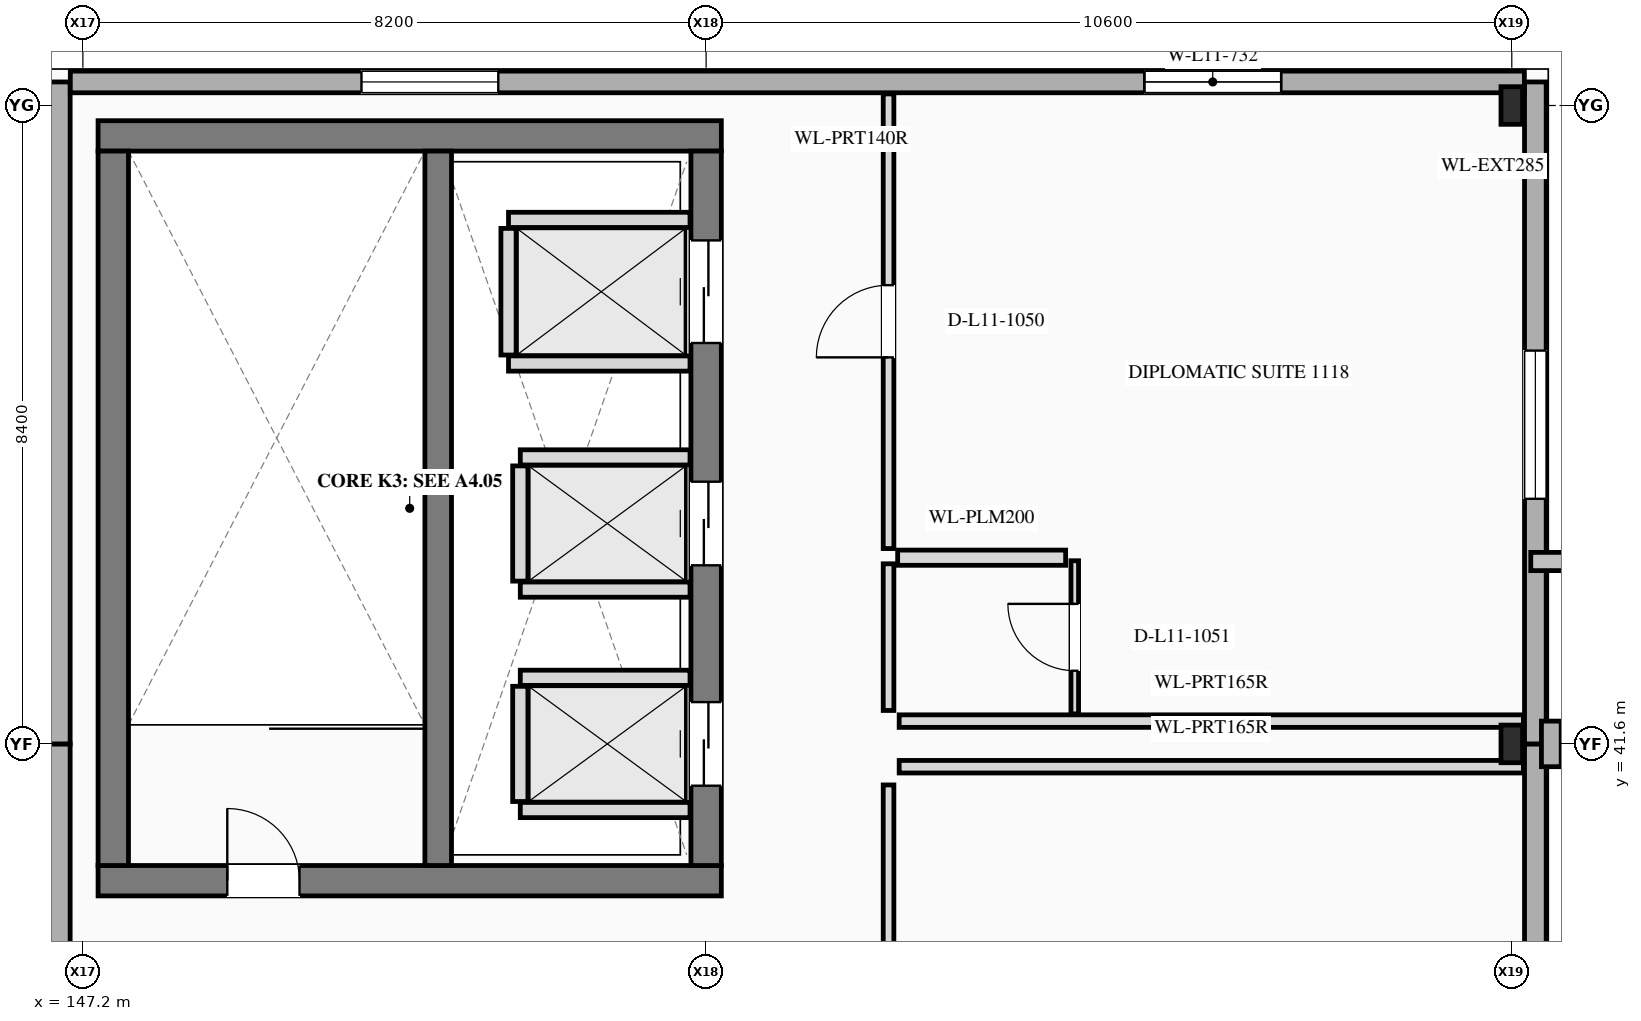
"""IFC4 building model, lengths in metres.
Left out: names, types, materials, properties, quantities, classifications, styles, units other than length and angle.
Written with IfcOpenShell. Run it as: python <this file> out.ifc"""

import sys

from ifc_helpers import new_model, si_unit, direction, frame, frame_2d, origin, origin_2d, place, context, subcontext, project, spatial, rectangle, i_section, extrude, element, fill, save


model = new_model("IFC4")
c1 = context("Model", 3, precision=1e-05, world=origin(), true_north=direction((0.0, 1.0)))
c2 = subcontext(c1, "Body", "Model", "MODEL_VIEW")
j1 = project(units=[si_unit("LENGTHUNIT", "METRE"), si_unit("PLANEANGLEUNIT", "RADIAN")], contexts=[c1])
p1 = place(None, origin())
s1 = spatial("IfcSite", under=j1, at=p1, CompositionType="ELEMENT")
p2 = place(p1, origin())
s2 = spatial("IfcBuilding", under=s1, at=p2, CompositionType="ELEMENT")
p3 = place(p2, frame((0.0, 0.0, 44.6)))
s3 = spatial("IfcBuildingStorey", under=s2, at=p3, CompositionType="ELEMENT", Elevation=44.6)
for number, where, z_axis, x_axis in (
    (1, (166.0, 41.6, 0.0), (0.0, 0.0, 1.0), (1.0, 0.0, 0.0)),
    (2, (166.0, 50.0, 0.0), (0.0, 0.0, 1.0), (1.0, 0.0, 0.0)),
):
    element("IfcColumn", number, at=place(p3, frame(where, z_axis=z_axis, x_axis=x_axis)), inside=s3, PredefinedType="COLUMN", context=c2, shape_type="SweptSolid", body=[
        extrude(i_section(OverallWidth=0.284, OverallDepth=0.495, WebThickness=0.019, FlangeThickness=0.033, at=origin_2d()), origin(), (0.0, 0.0, 1.0), 3.6),
    ])
p4 = place(p3, frame((166.31, 33.2, 0.0), z_axis=(0.0, 0.0, 1.0), x_axis=(0.0, 1.0, 0.0)))
e3 = element("IfcWall", 3, at=p4, inside=s3, PredefinedType="STANDARD", context=c2, shape_type="SweptSolid", body=[
    extrude(rectangle(XDim=8.4, YDim=0.285, at=frame_2d((4.2, 0.0))), origin(), (0.0, 0.0, 1.0), 3.6),
])
p5 = place(p4, frame((3.3, 0.0, 0.85)))
e4 = element("IfcOpeningElement", 4, at=p5, cuts=e3, PredefinedType="OPENING", context=c2, shape_type="SweptSolid", body=[
    extrude(rectangle(XDim=1.8, YDim=1.8, at=frame_2d((0.9, 0.9))), frame((0.0, 0.152, 0.0), z_axis=(0.0, -1.0, 0.0), x_axis=(1.0, 0.0, 0.0)), (0.0, 0.0, 1.0), 0.305),
])
p6 = place(p3, frame((166.31, 41.6, 0.0), z_axis=(0.0, 0.0, 1.0), x_axis=(0.0, 1.0, 0.0)))
e5 = element("IfcWall", 5, at=p6, inside=s3, PredefinedType="STANDARD", context=c2, shape_type="SweptSolid", body=[
    extrude(rectangle(XDim=8.71, YDim=0.285, at=frame_2d((4.355, 0.0))), origin(), (0.0, 0.0, 1.0), 3.6),
])
p7 = place(p6, frame((3.225, 0.0, 0.85)))
e6 = element("IfcOpeningElement", 6, at=p7, cuts=e5, PredefinedType="OPENING", context=c2, shape_type="SweptSolid", body=[
    extrude(rectangle(XDim=1.95, YDim=1.85, at=frame_2d((0.975, 0.925))), frame((0.0, 0.152, 0.0), z_axis=(0.0, -1.0, 0.0), x_axis=(1.0, 0.0, 0.0)), (0.0, 0.0, 1.0), 0.305),
])
p8 = place(p3, frame((166.52, 41.3, 0.0), z_axis=(0.0, 0.0, 1.0), x_axis=(0.0, 1.0, 0.0)))
e7 = element("IfcWall", 7, at=p8, inside=s3, PredefinedType="ELEMENTEDWALL", context=c2, shape_type="SweptSolid", body=[
    extrude(rectangle(XDim=0.6, YDim=0.26, at=frame_2d((0.3, 0.0))), origin(), (0.0, 0.0, 1.0), 3.6),
])
p9 = place(p3, frame((146.89, 33.2, 0.0), z_axis=(0.0, 0.0, 1.0), x_axis=(0.0, 1.0, 0.0)))
e8 = element("IfcWall", 8, at=p9, inside=s3, PredefinedType="STANDARD", context=c2, shape_type="SweptSolid", body=[
    extrude(rectangle(XDim=8.4, YDim=0.285, at=frame_2d((4.2, 0.0))), origin(), (0.0, 0.0, 1.0), 3.6),
])
p10 = place(p3, frame((146.89, 41.6, 0.0), z_axis=(0.0, 0.0, 1.0), x_axis=(0.0, 1.0, 0.0)))
e9 = element("IfcWall", 9, at=p10, inside=s3, PredefinedType="STANDARD", context=c2, shape_type="SweptSolid", body=[
    extrude(rectangle(XDim=8.71, YDim=0.285, at=frame_2d((4.355, 0.0))), origin(), (0.0, 0.0, 1.0), 3.6),
])
p11 = place(p3, frame((166.166, 50.31, 0.0), z_axis=(0.0, 0.0, 1.0), x_axis=(-1.0, 0.0, 0.0)))
e10 = element("IfcWall", 10, at=p11, inside=s3, PredefinedType="STANDARD", context=c2, shape_type="SweptSolid", body=[
    extrude(rectangle(XDim=19.131, YDim=0.285, at=frame_2d((9.565, 0.0))), origin(), (0.0, 0.0, 1.0), 3.6),
])
p12 = place(p11, frame((3.2, 0.0, 0.88)))
e11 = element("IfcOpeningElement", 11, at=p12, cuts=e10, PredefinedType="OPENING", context=c2, shape_type="SweptSolid", body=[
    extrude(rectangle(XDim=1.8, YDim=1.8, at=frame_2d((0.9, 0.9))), frame((0.0, 0.152, 0.0), z_axis=(0.0, -1.0, 0.0), x_axis=(1.0, 0.0, 0.0)), (0.0, 0.0, 1.0), 0.305),
])
p13 = place(p11, frame((13.5, 0.0, 0.88)))
e12 = element("IfcOpeningElement", 12, at=p13, cuts=e10, PredefinedType="OPENING", context=c2, shape_type="SweptSolid", body=[
    extrude(rectangle(XDim=1.8, YDim=1.8, at=frame_2d((0.9, 0.9))), frame((0.0, 0.152, 0.0), z_axis=(0.0, -1.0, 0.0), x_axis=(1.0, 0.0, 0.0)), (0.0, 0.0, 1.0), 0.305),
])
p14 = place(p3, frame((147.4, 39.8, 0.0), z_axis=(0.0, 0.0, 1.0), x_axis=(1.0, 0.0, 0.0)))
e13 = element("IfcWall", 13, at=p14, inside=s3, PredefinedType="SHEAR", context=c2, shape_type="SweptSolid", body=[
    extrude(rectangle(XDim=8.2, YDim=0.4, at=frame_2d((4.1, 0.0))), origin(), (0.0, 0.0, 1.0), 3.6),
])
p15 = place(p14, frame((1.7, 0.0, 0.0)))
e14 = element("IfcOpeningElement", 14, at=p15, cuts=e13, PredefinedType="OPENING", context=c2, shape_type="SweptSolid", body=[
    extrude(rectangle(XDim=0.95, YDim=2.2, at=frame_2d((0.475, 1.1))), frame((0.0, 0.21, 0.0), z_axis=(0.0, -1.0, 0.0), x_axis=(1.0, 0.0, 0.0)), (0.0, 0.0, 1.0), 0.42),
])
p16 = place(p3, frame((155.6, 49.6, 0.0), z_axis=(0.0, 0.0, 1.0), x_axis=(-1.0, 0.0, 0.0)))
e15 = element("IfcWall", 15, at=p16, inside=s3, PredefinedType="SHEAR", context=c2, shape_type="SweptSolid", body=[
    extrude(rectangle(XDim=8.2, YDim=0.4, at=frame_2d((4.1, 0.0))), origin(), (0.0, 0.0, 1.0), 3.6),
])
p17 = place(p3, frame((147.6, 49.4, 0.0), z_axis=(0.0, 0.0, 1.0), x_axis=(0.0, -1.0, 0.0)))
e16 = element("IfcWall", 16, at=p17, inside=s3, PredefinedType="SHEAR", context=c2, shape_type="SweptSolid", body=[
    extrude(rectangle(XDim=9.4, YDim=0.4, at=frame_2d((4.7, 0.0))), origin(), (0.0, 0.0, 1.0), 3.6),
])
p18 = place(p3, frame((155.4, 40.0, 0.0), z_axis=(0.0, 0.0, 1.0), x_axis=(0.0, 1.0, 0.0)))
e17 = element("IfcWall", 17, at=p18, inside=s3, PredefinedType="SHEAR", context=c2, shape_type="SweptSolid", body=[
    extrude(rectangle(XDim=9.4, YDim=0.4, at=frame_2d((4.7, 0.0))), origin(), (0.0, 0.0, 1.0), 3.6),
])
p19 = place(p18, frame((1.05, 0.0, 0.0)))
e18 = element("IfcOpeningElement", 18, at=p19, cuts=e17, PredefinedType="OPENING", context=c2, shape_type="SweptSolid", body=[
    extrude(rectangle(XDim=1.1, YDim=2.2, at=frame_2d((0.55, 1.1))), frame((0.0, 0.21, 0.0), z_axis=(0.0, -1.0, 0.0), x_axis=(1.0, 0.0, 0.0)), (0.0, 0.0, 1.0), 0.42),
])
p20 = place(p18, frame((3.95, 0.0, 0.0)))
e19 = element("IfcOpeningElement", 19, at=p20, cuts=e17, PredefinedType="OPENING", context=c2, shape_type="SweptSolid", body=[
    extrude(rectangle(XDim=1.1, YDim=2.2, at=frame_2d((0.55, 1.1))), frame((0.0, 0.21, 0.0), z_axis=(0.0, -1.0, 0.0), x_axis=(1.0, 0.0, 0.0)), (0.0, 0.0, 1.0), 0.42),
])
p21 = place(p18, frame((6.875, 0.0, 0.0)))
e20 = element("IfcOpeningElement", 20, at=p21, cuts=e17, PredefinedType="OPENING", context=c2, shape_type="SweptSolid", body=[
    extrude(rectangle(XDim=1.35, YDim=2.3, at=frame_2d((0.675, 1.15))), frame((0.0, 0.21, 0.0), z_axis=(0.0, -1.0, 0.0), x_axis=(1.0, 0.0, 0.0)), (0.0, 0.0, 1.0), 0.42),
])
p22 = place(p3, frame((151.875, 40.0, 0.0), z_axis=(0.0, 0.0, 1.0), x_axis=(0.0, 1.0, 0.0)))
e21 = element("IfcWall", 21, at=p22, inside=s3, PredefinedType="SHEAR", context=c2, shape_type="SweptSolid", body=[
    extrude(rectangle(XDim=9.4, YDim=0.35, at=frame_2d((4.7, 0.0))), origin(), (0.0, 0.0, 1.0), 3.6),
])
for number, where, z_axis, x_axis in (
    (22, (152.955, 40.73, 0.0), (0.0, 0.0, 1.0), (1.0, 0.0, 0.0)),
    (23, (152.955, 42.47, 0.0), (0.0, 0.0, 1.0), (1.0, 0.0, 0.0)),
):
    element("IfcWall", number, at=place(p3, frame(where, z_axis=z_axis, x_axis=x_axis)), inside=s3, PredefinedType="PLUMBINGWALL", context=c2, shape_type="SweptSolid", body=[
        extrude(rectangle(XDim=2.233, YDim=0.2, at=frame_2d((1.116, 0.0))), origin(), (0.0, 0.0, 1.0), 3.3),
    ])
p23 = place(p3, frame((152.955, 40.842, 0.0), z_axis=(0.0, 0.0, 1.0), x_axis=(0.0, 1.0, 0.0)))
e24 = element("IfcWall", 24, at=p23, inside=s3, PredefinedType="PLUMBINGWALL", context=c2, shape_type="SweptSolid", body=[
    extrude(rectangle(XDim=1.516, YDim=0.2, at=frame_2d((0.758, 0.0))), origin(), (0.0, 0.0, 1.0), 3.3),
])
for number, where, z_axis, x_axis in (
    (25, (152.955, 43.63, 0.0), (0.0, 0.0, 1.0), (1.0, 0.0, 0.0)),
    (26, (152.955, 45.37, 0.0), (0.0, 0.0, 1.0), (1.0, 0.0, 0.0)),
):
    element("IfcWall", number, at=place(p3, frame(where, z_axis=z_axis, x_axis=x_axis)), inside=s3, PredefinedType="PLUMBINGWALL", context=c2, shape_type="SweptSolid", body=[
        extrude(rectangle(XDim=2.233, YDim=0.2, at=frame_2d((1.116, 0.0))), origin(), (0.0, 0.0, 1.0), 3.3),
    ])
p24 = place(p3, frame((152.955, 43.742, 0.0), z_axis=(0.0, 0.0, 1.0), x_axis=(0.0, 1.0, 0.0)))
e27 = element("IfcWall", 27, at=p24, inside=s3, PredefinedType="PLUMBINGWALL", context=c2, shape_type="SweptSolid", body=[
    extrude(rectangle(XDim=1.516, YDim=0.2, at=frame_2d((0.758, 0.0))), origin(), (0.0, 0.0, 1.0), 3.3),
])
for number, where, z_axis, x_axis in (
    (28, (152.8, 46.605, 0.0), (0.0, 0.0, 1.0), (1.0, 0.0, 0.0)),
    (29, (152.8, 48.495, 0.0), (0.0, 0.0, 1.0), (1.0, 0.0, 0.0)),
):
    element("IfcWall", number, at=place(p3, frame(where, z_axis=z_axis, x_axis=x_axis)), inside=s3, PredefinedType="PLUMBINGWALL", context=c2, shape_type="SweptSolid", body=[
        extrude(rectangle(XDim=2.388, YDim=0.2, at=frame_2d((1.194, 0.0))), origin(), (0.0, 0.0, 1.0), 3.3),
    ])
p25 = place(p3, frame((152.8, 46.717, 0.0), z_axis=(0.0, 0.0, 1.0), x_axis=(0.0, 1.0, 0.0)))
e30 = element("IfcWall", 30, at=p25, inside=s3, PredefinedType="PLUMBINGWALL", context=c2, shape_type="SweptSolid", body=[
    extrude(rectangle(XDim=1.666, YDim=0.2, at=frame_2d((0.833, 0.0))), origin(), (0.0, 0.0, 1.0), 3.3),
])
p26 = place(p3, frame((157.8, 35.77, 0.0), z_axis=(0.0, 0.0, 1.0), x_axis=(0.0, 1.0, 0.0)))
e31 = element("IfcWall", 31, at=p26, inside=s3, PredefinedType="PARTITIONING", context=c2, shape_type="SweptSolid", body=[
    extrude(rectangle(XDim=5.29, YDim=0.14, at=frame_2d((2.645, 0.0))), origin(), (0.0, 0.0, 1.0), 3.3),
])
p27 = place(p26, frame((2.11, 0.0, 0.0)))
e32 = element("IfcOpeningElement", 32, at=p27, cuts=e31, PredefinedType="OPENING", context=c2, shape_type="SweptSolid", body=[
    extrude(rectangle(XDim=1.07, YDim=2.25, at=frame_2d((0.535, 1.125))), frame((0.0, 0.08, 0.0), z_axis=(0.0, -1.0, 0.0), x_axis=(1.0, 0.0, 0.0)), (0.0, 0.0, 1.0), 0.16),
])
p28 = place(p3, frame((157.94, 41.3, 0.0), z_axis=(0.0, 0.0, 1.0), x_axis=(1.0, 0.0, 0.0)))
e33 = element("IfcWall", 33, at=p28, inside=s3, PredefinedType="PARTITIONING", context=c2, shape_type="SweptSolid", body=[
    extrude(rectangle(XDim=8.213, YDim=0.165, at=frame_2d((4.106, 0.0))), origin(), (0.0, 0.0, 1.0), 2.69),
])
p29 = place(p3, frame((157.8, 42.04, 0.0), z_axis=(0.0, 0.0, 1.0), x_axis=(0.0, 1.0, 0.0)))
e34 = element("IfcWall", 34, at=p29, inside=s3, PredefinedType="PARTITIONING", context=c2, shape_type="SweptSolid", body=[
    extrude(rectangle(XDim=1.93, YDim=0.14, at=frame_2d((0.965, 0.0))), origin(), (0.0, 0.0, 1.0), 3.3),
])
p30 = place(p3, frame((157.8, 44.17, 0.0), z_axis=(0.0, 0.0, 1.0), x_axis=(0.0, 1.0, 0.0)))
e35 = element("IfcWall", 35, at=p30, inside=s3, PredefinedType="PARTITIONING", context=c2, shape_type="SweptSolid", body=[
    extrude(rectangle(XDim=5.983, YDim=0.14, at=frame_2d((2.991, 0.0))), origin(), (0.0, 0.0, 1.0), 3.3),
])
p31 = place(p30, frame((2.516, 0.0, 0.0)))
e36 = element("IfcOpeningElement", 36, at=p31, cuts=e35, PredefinedType="OPENING", context=c2, shape_type="SweptSolid", body=[
    extrude(rectangle(XDim=0.95, YDim=2.3, at=frame_2d((0.475, 1.15))), frame((0.0, 0.08, 0.0), z_axis=(0.0, -1.0, 0.0), x_axis=(1.0, 0.0, 0.0)), (0.0, 0.0, 1.0), 0.16),
])
p32 = place(p3, frame((157.94, 41.9, 0.0), z_axis=(0.0, 0.0, 1.0), x_axis=(1.0, 0.0, 0.0)))
e37 = element("IfcWall", 37, at=p32, inside=s3, PredefinedType="PARTITIONING", context=c2, shape_type="SweptSolid", body=[
    extrude(rectangle(XDim=8.213, YDim=0.165, at=frame_2d((4.106, 0.0))), origin(), (0.0, 0.0, 1.0), 2.69),
])
p33 = place(p3, frame((157.92, 44.05, 0.0), z_axis=(0.0, 0.0, 1.0), x_axis=(1.0, 0.0, 0.0)))
e38 = element("IfcWall", 38, at=p33, inside=s3, PredefinedType="PLUMBINGWALL", context=c2, shape_type="SweptSolid", body=[
    extrude(rectangle(XDim=2.21, YDim=0.2, at=frame_2d((1.105, 0.0))), origin(), (0.0, 0.0, 1.0), 3.3),
])
p34 = place(p3, frame((160.25, 41.994, 0.0), z_axis=(0.0, 0.0, 1.0), x_axis=(0.0, 1.0, 0.0)))
e39 = element("IfcWall", 39, at=p34, inside=s3, PredefinedType="PARTITIONING", context=c2, shape_type="SweptSolid", body=[
    extrude(rectangle(XDim=2.016, YDim=0.1, at=frame_2d((1.008, 0.0))), origin(), (0.0, 0.0, 1.0), 3.3),
])
p35 = place(p34, frame((0.568, 0.0, 0.0)))
e40 = element("IfcOpeningElement", 40, at=p35, cuts=e39, PredefinedType="OPENING", context=c2, shape_type="SweptSolid", body=[
    extrude(rectangle(XDim=0.88, YDim=2.18, at=frame_2d((0.44, 1.09))), frame((0.0, 0.06, 0.0), z_axis=(0.0, -1.0, 0.0), x_axis=(1.0, 0.0, 0.0)), (0.0, 0.0, 1.0), 0.12),
])
p36 = place(p7, origin())
e41 = element("IfcWindow", 41, at=p36, inside=s3, PartitioningType="SINGLE_PANEL", PredefinedType="WINDOW", context=c2, shape_type="SweptSolid", body=[
    extrude(rectangle(XDim=1.95, YDim=1.85, at=frame_2d((0.975, 0.925))), frame((0.0, 0.03, 0.0), z_axis=(0.0, -1.0, 0.0), x_axis=(1.0, 0.0, 0.0)), (0.0, 0.0, 1.0), 0.06),
])
fill(e6, e41)
p37 = place(p12, origin())
e42 = element("IfcWindow", 42, at=p37, inside=s3, PartitioningType="SINGLE_PANEL", PredefinedType="WINDOW", context=c2, shape_type="SweptSolid", body=[
    extrude(rectangle(XDim=1.8, YDim=1.8, at=frame_2d((0.9, 0.9))), frame((0.0, 0.03, 0.0), z_axis=(0.0, -1.0, 0.0), x_axis=(1.0, 0.0, 0.0)), (0.0, 0.0, 1.0), 0.06),
])
fill(e11, e42)
p38 = place(p13, origin())
e43 = element("IfcWindow", 43, at=p38, inside=s3, PartitioningType="SINGLE_PANEL", PredefinedType="WINDOW", context=c2, shape_type="SweptSolid", body=[
    extrude(rectangle(XDim=1.8, YDim=1.8, at=frame_2d((0.9, 0.9))), frame((0.0, 0.03, 0.0), z_axis=(0.0, -1.0, 0.0), x_axis=(1.0, 0.0, 0.0)), (0.0, 0.0, 1.0), 0.06),
])
fill(e12, e43)
p39 = place(p15, origin())
e44 = element("IfcDoor", 44, at=p39, inside=s3, OperationType="SINGLE_SWING_LEFT", PredefinedType="DOOR", context=c2, shape_type="SweptSolid", body=[
    extrude(rectangle(XDim=0.95, YDim=2.2, at=frame_2d((0.475, 1.1))), frame((0.0, 0.025, 0.0), z_axis=(0.0, -1.0, 0.0), x_axis=(1.0, 0.0, 0.0)), (0.0, 0.0, 1.0), 0.05),
])
fill(e14, e44)
p40 = place(p19, origin())
e45 = element("IfcDoor", 45, at=p40, inside=s3, OperationType="SLIDING_TO_LEFT", PredefinedType="DOOR", context=c2, shape_type="SweptSolid", body=[
    extrude(rectangle(XDim=1.1, YDim=2.2, at=frame_2d((0.55, 1.1))), frame((0.0, 0.025, 0.0), z_axis=(0.0, -1.0, 0.0), x_axis=(1.0, 0.0, 0.0)), (0.0, 0.0, 1.0), 0.05),
])
fill(e18, e45)
p41 = place(p20, origin())
e46 = element("IfcDoor", 46, at=p41, inside=s3, OperationType="SLIDING_TO_RIGHT", PredefinedType="DOOR", context=c2, shape_type="SweptSolid", body=[
    extrude(rectangle(XDim=1.1, YDim=2.2, at=frame_2d((0.55, 1.1))), frame((0.0, 0.025, 0.0), z_axis=(0.0, -1.0, 0.0), x_axis=(1.0, 0.0, 0.0)), (0.0, 0.0, 1.0), 0.05),
])
fill(e19, e46)
p42 = place(p21, origin())
e47 = element("IfcDoor", 47, at=p42, inside=s3, OperationType="SLIDING_TO_LEFT", PredefinedType="DOOR", context=c2, shape_type="SweptSolid", body=[
    extrude(rectangle(XDim=1.35, YDim=2.3, at=frame_2d((0.675, 1.15))), frame((0.0, 0.025, 0.0), z_axis=(0.0, -1.0, 0.0), x_axis=(1.0, 0.0, 0.0)), (0.0, 0.0, 1.0), 0.05),
])
fill(e20, e47)
p43 = place(p31, origin())
e48 = element("IfcDoor", 48, at=p43, inside=s3, OperationType="SINGLE_SWING_LEFT", PredefinedType="DOOR", context=c2, shape_type="SweptSolid", body=[
    extrude(rectangle(XDim=0.95, YDim=2.3, at=frame_2d((0.475, 1.15))), frame((0.0, 0.025, 0.0), z_axis=(0.0, -1.0, 0.0), x_axis=(1.0, 0.0, 0.0)), (0.0, 0.0, 1.0), 0.05),
])
fill(e36, e48)
p44 = place(p35, origin())
e49 = element("IfcDoor", 49, at=p44, inside=s3, OperationType="SINGLE_SWING_RIGHT", PredefinedType="DOOR", context=c2, shape_type="SweptSolid", body=[
    extrude(rectangle(XDim=0.88, YDim=2.18, at=frame_2d((0.44, 1.09))), frame((0.0, 0.025, 0.0), z_axis=(0.0, -1.0, 0.0), x_axis=(1.0, 0.0, 0.0)), (0.0, 0.0, 1.0), 0.05),
])
fill(e40, e49)
save(model, sys.argv[1])
